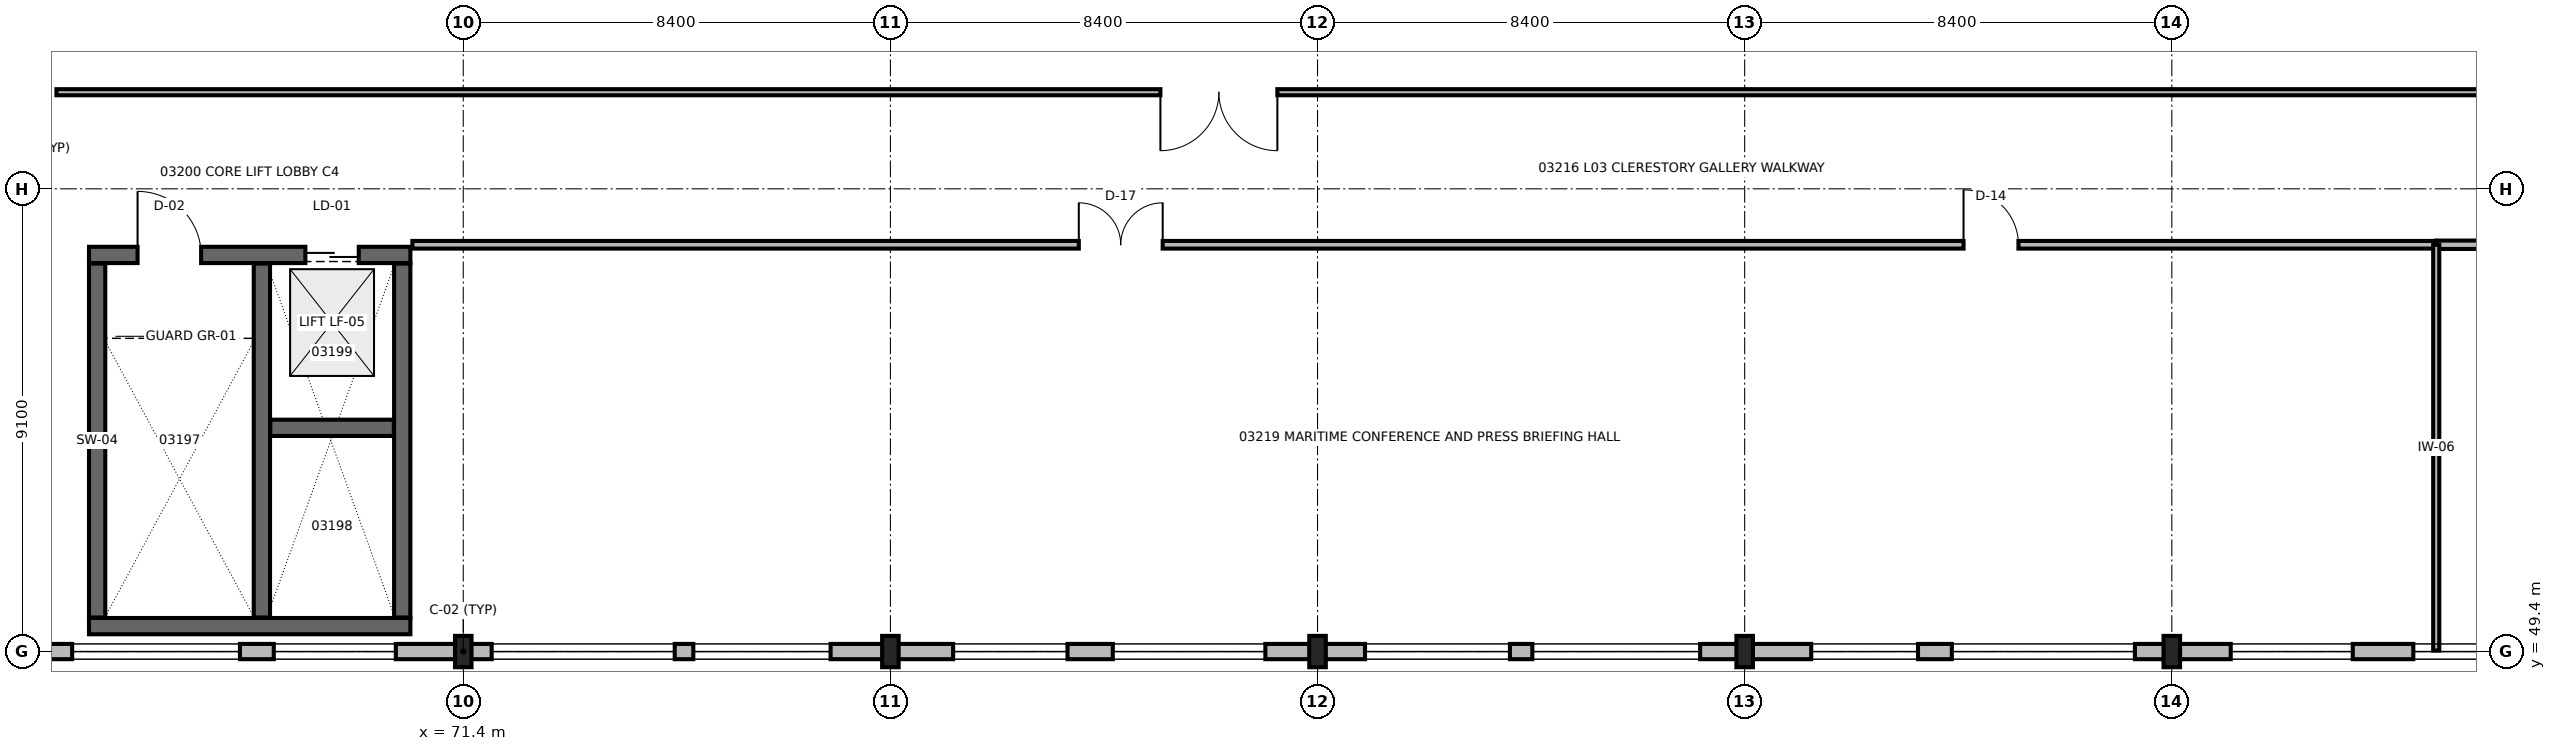
"""IFC4 building model, lengths in metres.
Left out: names, types, materials, properties, quantities, classifications, styles, units other than length and angle.
Written with IfcOpenShell. Run it as: python <this file> out.ifc"""

import sys

from ifc_helpers import new_model, si_unit, direction, frame, frame_2d, origin, origin_2d, place, context, subcontext, project, spatial, rectangle, i_section, extrude, element, fill, save


model = new_model("IFC4")
c1 = context("Model", 3, precision=1e-05, world=origin(), true_north=direction((0.0, 1.0)))
c2 = subcontext(c1, "Body", "Model", "MODEL_VIEW")
j1 = project(units=[si_unit("LENGTHUNIT", "METRE"), si_unit("PLANEANGLEUNIT", "RADIAN")], contexts=[c1])
p1 = place(None, origin())
s1 = spatial("IfcSite", under=j1, at=p1, CompositionType="ELEMENT")
p2 = place(p1, origin())
s2 = spatial("IfcBuilding", under=s1, at=p2, CompositionType="ELEMENT")
p3 = place(p2, frame((0.0, 0.0, 13.8)))
s3 = spatial("IfcBuildingStorey", under=s2, at=p3, CompositionType="ELEMENT", Elevation=13.8)
for number, where, z_axis, x_axis in (
    (1, (71.4, 49.4, 0.0), (0.0, 0.0, 1.0), (1.0, 0.0, 0.0)),
    (2, (79.8, 49.4, 0.0), (0.0, 0.0, 1.0), (1.0, 0.0, 0.0)),
    (3, (88.2, 49.4, 0.0), (0.0, 0.0, 1.0), (1.0, 0.0, 0.0)),
    (4, (96.6, 49.4, 0.0), (0.0, 0.0, 1.0), (1.0, 0.0, 0.0)),
    (5, (105.0, 49.4, 0.0), (0.0, 0.0, 1.0), (1.0, 0.0, 0.0)),
):
    element("IfcColumn", number, at=place(p3, frame(where, z_axis=z_axis, x_axis=x_axis)), inside=s3, PredefinedType="COLUMN", context=c2, shape_type="SweptSolid", body=[
        extrude(i_section(OverallWidth=0.325, OverallDepth=0.616, WebThickness=0.014, FlangeThickness=0.021, at=origin_2d()), origin(), (0.0, 0.0, 1.0), 10.273),
    ])
p4 = place(p3, frame((71.385, 49.4, 0.0), z_axis=(0.0, 0.0, 1.0), x_axis=(-1.0, 0.0, 0.0)))
e6 = element("IfcWall", 6, at=p4, inside=s3, PredefinedType="SOLIDWALL", context=c2, shape_type="SweptSolid", body=[
    extrude(rectangle(XDim=8.37, YDim=0.3, at=frame_2d((4.185, 0.0))), origin(), (0.0, 0.0, 1.0), 8.5),
])
p5 = place(p4, frame((1.311, 0.0, 5.4)))
e7 = element("IfcOpeningElement", 7, at=p5, cuts=e6, PredefinedType="OPENING", context=c2, shape_type="SweptSolid", body=[
    extrude(rectangle(XDim=2.4, YDim=1.15, at=frame_2d((1.2, 0.575))), frame((0.0, 0.16, 0.0), z_axis=(0.0, -1.0, 0.0), x_axis=(1.0, 0.0, 0.0)), (0.0, 0.0, 1.0), 0.32),
])
p6 = place(p4, frame((4.376, 0.0, 5.4)))
e8 = element("IfcOpeningElement", 8, at=p6, cuts=e6, PredefinedType="OPENING", context=c2, shape_type="SweptSolid", body=[
    extrude(rectangle(XDim=3.3, YDim=1.3, at=frame_2d((1.65, 0.65))), frame((0.0, 0.16, 0.0), z_axis=(0.0, -1.0, 0.0), x_axis=(1.0, 0.0, 0.0)), (0.0, 0.0, 1.0), 0.32),
])
p7 = place(p3, frame((79.785, 49.4, 0.0), z_axis=(0.0, 0.0, 1.0), x_axis=(-1.0, 0.0, 0.0)))
e9 = element("IfcWall", 9, at=p7, inside=s3, PredefinedType="SOLIDWALL", context=c2, shape_type="SweptSolid", body=[
    extrude(rectangle(XDim=8.37, YDim=0.3, at=frame_2d((4.185, 0.0))), origin(), (0.0, 0.0, 1.0), 8.5),
])
p8 = place(p7, frame((1.161, 0.0, 5.4)))
e10 = element("IfcOpeningElement", 10, at=p8, cuts=e9, PredefinedType="OPENING", context=c2, shape_type="SweptSolid", body=[
    extrude(rectangle(XDim=2.7, YDim=1.15, at=frame_2d((1.35, 0.575))), frame((0.0, 0.16, 0.0), z_axis=(0.0, -1.0, 0.0), x_axis=(1.0, 0.0, 0.0)), (0.0, 0.0, 1.0), 0.32),
])
p9 = place(p7, frame((4.226, 0.0, 5.4)))
e11 = element("IfcOpeningElement", 11, at=p9, cuts=e9, PredefinedType="OPENING", context=c2, shape_type="SweptSolid", body=[
    extrude(rectangle(XDim=3.6, YDim=1.3, at=frame_2d((1.8, 0.65))), frame((0.0, 0.16, 0.0), z_axis=(0.0, -1.0, 0.0), x_axis=(1.0, 0.0, 0.0)), (0.0, 0.0, 1.0), 0.32),
])
p10 = place(p3, frame((88.185, 49.4, 0.0), z_axis=(0.0, 0.0, 1.0), x_axis=(-1.0, 0.0, 0.0)))
e12 = element("IfcWall", 12, at=p10, inside=s3, PredefinedType="SOLIDWALL", context=c2, shape_type="SweptSolid", body=[
    extrude(rectangle(XDim=8.37, YDim=0.3, at=frame_2d((4.185, 0.0))), origin(), (0.0, 0.0, 1.0), 8.5),
])
p11 = place(p10, frame((1.011, 0.0, 5.4)))
e13 = element("IfcOpeningElement", 13, at=p11, cuts=e12, PredefinedType="OPENING", context=c2, shape_type="SweptSolid", body=[
    extrude(rectangle(XDim=3.0, YDim=1.2, at=frame_2d((1.5, 0.6))), frame((0.0, 0.16, 0.0), z_axis=(0.0, -1.0, 0.0), x_axis=(1.0, 0.0, 0.0)), (0.0, 0.0, 1.0), 0.32),
])
p12 = place(p10, frame((4.901, 0.0, 5.4)))
e14 = element("IfcOpeningElement", 14, at=p12, cuts=e12, PredefinedType="OPENING", context=c2, shape_type="SweptSolid", body=[
    extrude(rectangle(XDim=2.25, YDim=1.1, at=frame_2d((1.125, 0.55))), frame((0.0, 0.16, 0.0), z_axis=(0.0, -1.0, 0.0), x_axis=(1.0, 0.0, 0.0)), (0.0, 0.0, 1.0), 0.32),
])
p13 = place(p3, frame((96.585, 49.4, 0.0), z_axis=(0.0, 0.0, 1.0), x_axis=(-1.0, 0.0, 0.0)))
e15 = element("IfcWall", 15, at=p13, inside=s3, PredefinedType="SOLIDWALL", context=c2, shape_type="SweptSolid", body=[
    extrude(rectangle(XDim=8.37, YDim=0.3, at=frame_2d((4.185, 0.0))), origin(), (0.0, 0.0, 1.0), 8.5),
])
p14 = place(p13, frame((0.861, 0.0, 5.4)))
e16 = element("IfcOpeningElement", 16, at=p14, cuts=e15, PredefinedType="OPENING", context=c2, shape_type="SweptSolid", body=[
    extrude(rectangle(XDim=3.3, YDim=1.3, at=frame_2d((1.65, 0.65))), frame((0.0, 0.16, 0.0), z_axis=(0.0, -1.0, 0.0), x_axis=(1.0, 0.0, 0.0)), (0.0, 0.0, 1.0), 0.32),
])
p15 = place(p13, frame((4.601, 0.0, 5.4)))
e17 = element("IfcOpeningElement", 17, at=p15, cuts=e15, PredefinedType="OPENING", context=c2, shape_type="SweptSolid", body=[
    extrude(rectangle(XDim=2.85, YDim=1.25, at=frame_2d((1.425, 0.625))), frame((0.0, 0.16, 0.0), z_axis=(0.0, -1.0, 0.0), x_axis=(1.0, 0.0, 0.0)), (0.0, 0.0, 1.0), 0.32),
])
p16 = place(p3, frame((104.985, 49.4, 0.0), z_axis=(0.0, 0.0, 1.0), x_axis=(-1.0, 0.0, 0.0)))
e18 = element("IfcWall", 18, at=p16, inside=s3, PredefinedType="SOLIDWALL", context=c2, shape_type="SweptSolid", body=[
    extrude(rectangle(XDim=8.37, YDim=0.3, at=frame_2d((4.185, 0.0))), origin(), (0.0, 0.0, 1.0), 8.5),
])
p17 = place(p16, frame((0.711, 0.0, 5.4)))
e19 = element("IfcOpeningElement", 19, at=p17, cuts=e18, PredefinedType="OPENING", context=c2, shape_type="SweptSolid", body=[
    extrude(rectangle(XDim=3.6, YDim=1.3, at=frame_2d((1.8, 0.65))), frame((0.0, 0.16, 0.0), z_axis=(0.0, -1.0, 0.0), x_axis=(1.0, 0.0, 0.0)), (0.0, 0.0, 1.0), 0.32),
])
p18 = place(p16, frame((4.976, 0.0, 5.4)))
e20 = element("IfcOpeningElement", 20, at=p18, cuts=e18, PredefinedType="OPENING", context=c2, shape_type="SweptSolid", body=[
    extrude(rectangle(XDim=2.1, YDim=1.05, at=frame_2d((1.05, 0.525))), frame((0.0, 0.16, 0.0), z_axis=(0.0, -1.0, 0.0), x_axis=(1.0, 0.0, 0.0)), (0.0, 0.0, 1.0), 0.32),
])
p19 = place(p3, frame((113.385, 49.4, 0.0), z_axis=(0.0, 0.0, 1.0), x_axis=(-1.0, 0.0, 0.0)))
e21 = element("IfcWall", 21, at=p19, inside=s3, PredefinedType="SOLIDWALL", context=c2, shape_type="SweptSolid", body=[
    extrude(rectangle(XDim=8.37, YDim=0.3, at=frame_2d((4.185, 0.0))), origin(), (0.0, 0.0, 1.0), 8.5),
])
p20 = place(p19, frame((1.386, 0.0, 5.4)))
e22 = element("IfcOpeningElement", 22, at=p20, cuts=e21, PredefinedType="OPENING", context=c2, shape_type="SweptSolid", body=[
    extrude(rectangle(XDim=2.25, YDim=1.1, at=frame_2d((1.125, 0.55))), frame((0.0, 0.16, 0.0), z_axis=(0.0, -1.0, 0.0), x_axis=(1.0, 0.0, 0.0)), (0.0, 0.0, 1.0), 0.32),
])
p21 = place(p19, frame((4.826, 0.0, 5.4)))
e23 = element("IfcOpeningElement", 23, at=p21, cuts=e21, PredefinedType="OPENING", context=c2, shape_type="SweptSolid", body=[
    extrude(rectangle(XDim=2.4, YDim=1.15, at=frame_2d((1.2, 0.575))), frame((0.0, 0.16, 0.0), z_axis=(0.0, -1.0, 0.0), x_axis=(1.0, 0.0, 0.0)), (0.0, 0.0, 1.0), 0.32),
])
p22 = place(p3, frame((64.04, 49.9, 0.0), z_axis=(0.0, 0.0, 1.0), x_axis=(1.0, 0.0, 0.0)))
e24 = element("IfcWall", 24, at=p22, inside=s3, PredefinedType="SHEAR", context=c2, shape_type="SweptSolid", body=[
    extrude(rectangle(XDim=6.32, YDim=0.32, at=frame_2d((3.16, 0.0))), origin(), (0.0, 0.0, 1.0), 3.62),
])
p23 = place(p3, frame((64.04, 57.2, 0.0), z_axis=(0.0, 0.0, 1.0), x_axis=(1.0, 0.0, 0.0)))
e25 = element("IfcWall", 25, at=p23, inside=s3, PredefinedType="SHEAR", context=c2, shape_type="SweptSolid", body=[
    extrude(rectangle(XDim=6.32, YDim=0.32, at=frame_2d((3.16, 0.0))), origin(), (0.0, 0.0, 1.0), 3.62),
])
p24 = place(p23, frame((0.955, 0.0, 0.0)))
e26 = element("IfcOpeningElement", 26, at=p24, cuts=e25, PredefinedType="OPENING", context=c2, shape_type="SweptSolid", body=[
    extrude(rectangle(XDim=1.25, YDim=2.2, at=frame_2d((0.625, 1.1))), frame((0.0, 0.17, 0.0), z_axis=(0.0, -1.0, 0.0), x_axis=(1.0, 0.0, 0.0)), (0.0, 0.0, 1.0), 0.34),
])
p25 = place(p23, frame((4.255, 0.0, 0.0)))
e27 = element("IfcOpeningElement", 27, at=p25, cuts=e25, PredefinedType="OPENING", context=c2, shape_type="SweptSolid", body=[
    extrude(rectangle(XDim=1.05, YDim=2.15, at=frame_2d((0.525, 1.075))), frame((0.0, 0.17, 0.0), z_axis=(0.0, -1.0, 0.0), x_axis=(1.0, 0.0, 0.0)), (0.0, 0.0, 1.0), 0.34),
])
for number, where, z_axis, x_axis in (
    (28, (64.2, 50.07, 0.0), (0.0, 0.0, 1.0), (0.0, 1.0, 0.0)),
    (29, (70.2, 50.07, 0.0), (0.0, 0.0, 1.0), (0.0, 1.0, 0.0)),
    (30, (67.44, 50.07, 0.0), (0.0, 0.0, 1.0), (0.0, 1.0, 0.0)),
):
    element("IfcWall", number, at=place(p3, frame(where, z_axis=z_axis, x_axis=x_axis)), inside=s3, PredefinedType="SHEAR", context=c2, shape_type="SweptSolid", body=[
        extrude(rectangle(XDim=6.96, YDim=0.32, at=frame_2d((3.48, 0.0))), origin(), (0.0, 0.0, 1.0), 3.62),
    ])
p26 = place(p3, frame((67.605, 53.8, 0.0), z_axis=(0.0, 0.0, 1.0), x_axis=(1.0, 0.0, 0.0)))
e31 = element("IfcWall", 31, at=p26, inside=s3, PredefinedType="SHEAR", context=c2, shape_type="SweptSolid", body=[
    extrude(rectangle(XDim=2.43, YDim=0.32, at=frame_2d((1.215, 0.0))), origin(), (0.0, 0.0, 1.0), 3.62),
])
p27 = place(p3, frame((70.4, 57.4, 0.0), z_axis=(0.0, 0.0, 1.0), x_axis=(1.0, 0.0, 0.0)))
e32 = element("IfcWall", 32, at=p27, inside=s3, PredefinedType="PARTITIONING", context=c2, shape_type="SweptSolid", body=[
    extrude(rectangle(XDim=39.8, YDim=0.15, at=frame_2d((19.9, 0.0))), origin(), (0.0, 0.0, 1.0), 3.64),
])
p28 = place(p27, frame((13.105, 0.0, 0.0)))
e33 = element("IfcOpeningElement", 33, at=p28, cuts=e32, PredefinedType="OPENING", context=c2, shape_type="SweptSolid", body=[
    extrude(rectangle(XDim=1.65, YDim=2.3, at=frame_2d((0.825, 1.15))), frame((0.0, 0.085, 0.0), z_axis=(0.0, -1.0, 0.0), x_axis=(1.0, 0.0, 0.0)), (0.0, 0.0, 1.0), 0.17),
])
p29 = place(p27, frame((30.504, 0.0, 0.0)))
e34 = element("IfcOpeningElement", 34, at=p29, cuts=e32, PredefinedType="OPENING", context=c2, shape_type="SweptSolid", body=[
    extrude(rectangle(XDim=1.08, YDim=2.2, at=frame_2d((0.54, 1.1))), frame((0.0, 0.085, 0.0), z_axis=(0.0, -1.0, 0.0), x_axis=(1.0, 0.0, 0.0)), (0.0, 0.0, 1.0), 0.17),
])
p30 = place(p3, frame((110.2, 57.4, 0.0), z_axis=(0.0, 0.0, 1.0), x_axis=(1.0, 0.0, 0.0)))
e35 = element("IfcWall", 35, at=p30, inside=s3, PredefinedType="PARTITIONING", context=c2, shape_type="SweptSolid", body=[
    extrude(rectangle(XDim=28.36, YDim=0.165, at=frame_2d((14.18, 0.0))), origin(), (0.0, 0.0, 1.0), 3.64),
])
p31 = place(p30, frame((13.505, 0.0, 0.0)))
e36 = element("IfcOpeningElement", 36, at=p31, cuts=e35, PredefinedType="OPENING", context=c2, shape_type="SweptSolid", body=[
    extrude(rectangle(XDim=1.35, YDim=2.2, at=frame_2d((0.675, 1.1))), frame((0.0, 0.093, 0.0), z_axis=(0.0, -1.0, 0.0), x_axis=(1.0, 0.0, 0.0)), (0.0, 0.0, 1.0), 0.185),
])
p32 = place(p3, frame((110.2, 49.42, 0.0), z_axis=(0.0, 0.0, 1.0), x_axis=(0.0, 1.0, 0.0)))
e37 = element("IfcWall", 37, at=p32, inside=s3, PredefinedType="PARTITIONING", context=c2, shape_type="SweptSolid", body=[
    extrude(rectangle(XDim=7.98, YDim=0.12, at=frame_2d((3.99, 0.0))), origin(), (0.0, 0.0, 1.0), 3.64),
])
p33 = place(p3, frame((63.4, 60.4, 0.0), z_axis=(0.0, 0.0, 1.0), x_axis=(1.0, 0.0, 0.0)))
e38 = element("IfcWall", 38, at=p33, inside=s3, PredefinedType="PARTITIONING", context=c2, shape_type="SweptSolid", body=[
    extrude(rectangle(XDim=50.8, YDim=0.12, at=frame_2d((25.4, 0.0))), origin(), (0.0, 0.0, 1.0), 3.64),
])
p34 = place(p33, frame((21.71, 0.0, 0.0)))
e39 = element("IfcOpeningElement", 39, at=p34, cuts=e38, PredefinedType="OPENING", context=c2, shape_type="SweptSolid", body=[
    extrude(rectangle(XDim=2.3, YDim=2.45, at=frame_2d((1.15, 1.225))), frame((0.0, 0.07, 0.0), z_axis=(0.0, -1.0, 0.0), x_axis=(1.0, 0.0, 0.0)), (0.0, 0.0, 1.0), 0.14),
])
p35 = place(p5, origin())
e40 = element("IfcWindow", 40, at=p35, inside=s3, PartitioningType="SINGLE_PANEL", PredefinedType="SKYLIGHT", context=c2, shape_type="SweptSolid", body=[
    extrude(rectangle(XDim=2.4, YDim=1.15, at=frame_2d((1.2, 0.575))), frame((0.0, 0.03, 0.0), z_axis=(0.0, -1.0, 0.0), x_axis=(1.0, 0.0, 0.0)), (0.0, 0.0, 1.0), 0.06),
])
fill(e7, e40)
p36 = place(p6, origin())
e41 = element("IfcWindow", 41, at=p36, inside=s3, PartitioningType="SINGLE_PANEL", PredefinedType="SKYLIGHT", context=c2, shape_type="SweptSolid", body=[
    extrude(rectangle(XDim=3.3, YDim=1.3, at=frame_2d((1.65, 0.65))), frame((0.0, 0.03, 0.0), z_axis=(0.0, -1.0, 0.0), x_axis=(1.0, 0.0, 0.0)), (0.0, 0.0, 1.0), 0.06),
])
fill(e8, e41)
p37 = place(p8, origin())
e42 = element("IfcWindow", 42, at=p37, inside=s3, PartitioningType="SINGLE_PANEL", PredefinedType="SKYLIGHT", context=c2, shape_type="SweptSolid", body=[
    extrude(rectangle(XDim=2.7, YDim=1.15, at=frame_2d((1.35, 0.575))), frame((0.0, 0.03, 0.0), z_axis=(0.0, -1.0, 0.0), x_axis=(1.0, 0.0, 0.0)), (0.0, 0.0, 1.0), 0.06),
])
fill(e10, e42)
p38 = place(p9, origin())
e43 = element("IfcWindow", 43, at=p38, inside=s3, PartitioningType="SINGLE_PANEL", PredefinedType="SKYLIGHT", context=c2, shape_type="SweptSolid", body=[
    extrude(rectangle(XDim=3.6, YDim=1.3, at=frame_2d((1.8, 0.65))), frame((0.0, 0.03, 0.0), z_axis=(0.0, -1.0, 0.0), x_axis=(1.0, 0.0, 0.0)), (0.0, 0.0, 1.0), 0.06),
])
fill(e11, e43)
p39 = place(p11, origin())
e44 = element("IfcWindow", 44, at=p39, inside=s3, PartitioningType="SINGLE_PANEL", PredefinedType="SKYLIGHT", context=c2, shape_type="SweptSolid", body=[
    extrude(rectangle(XDim=3.0, YDim=1.2, at=frame_2d((1.5, 0.6))), frame((0.0, 0.03, 0.0), z_axis=(0.0, -1.0, 0.0), x_axis=(1.0, 0.0, 0.0)), (0.0, 0.0, 1.0), 0.06),
])
fill(e13, e44)
p40 = place(p12, origin())
e45 = element("IfcWindow", 45, at=p40, inside=s3, PartitioningType="SINGLE_PANEL", PredefinedType="SKYLIGHT", context=c2, shape_type="SweptSolid", body=[
    extrude(rectangle(XDim=2.25, YDim=1.1, at=frame_2d((1.125, 0.55))), frame((0.0, 0.03, 0.0), z_axis=(0.0, -1.0, 0.0), x_axis=(1.0, 0.0, 0.0)), (0.0, 0.0, 1.0), 0.06),
])
fill(e14, e45)
p41 = place(p14, origin())
e46 = element("IfcWindow", 46, at=p41, inside=s3, PartitioningType="SINGLE_PANEL", PredefinedType="SKYLIGHT", context=c2, shape_type="SweptSolid", body=[
    extrude(rectangle(XDim=3.3, YDim=1.3, at=frame_2d((1.65, 0.65))), frame((0.0, 0.03, 0.0), z_axis=(0.0, -1.0, 0.0), x_axis=(1.0, 0.0, 0.0)), (0.0, 0.0, 1.0), 0.06),
])
fill(e16, e46)
p42 = place(p15, origin())
e47 = element("IfcWindow", 47, at=p42, inside=s3, PartitioningType="SINGLE_PANEL", PredefinedType="SKYLIGHT", context=c2, shape_type="SweptSolid", body=[
    extrude(rectangle(XDim=2.85, YDim=1.25, at=frame_2d((1.425, 0.625))), frame((0.0, 0.03, 0.0), z_axis=(0.0, -1.0, 0.0), x_axis=(1.0, 0.0, 0.0)), (0.0, 0.0, 1.0), 0.06),
])
fill(e17, e47)
p43 = place(p17, origin())
e48 = element("IfcWindow", 48, at=p43, inside=s3, PartitioningType="SINGLE_PANEL", PredefinedType="SKYLIGHT", context=c2, shape_type="SweptSolid", body=[
    extrude(rectangle(XDim=3.6, YDim=1.3, at=frame_2d((1.8, 0.65))), frame((0.0, 0.03, 0.0), z_axis=(0.0, -1.0, 0.0), x_axis=(1.0, 0.0, 0.0)), (0.0, 0.0, 1.0), 0.06),
])
fill(e19, e48)
p44 = place(p18, origin())
e49 = element("IfcWindow", 49, at=p44, inside=s3, PartitioningType="SINGLE_PANEL", PredefinedType="SKYLIGHT", context=c2, shape_type="SweptSolid", body=[
    extrude(rectangle(XDim=2.1, YDim=1.05, at=frame_2d((1.05, 0.525))), frame((0.0, 0.03, 0.0), z_axis=(0.0, -1.0, 0.0), x_axis=(1.0, 0.0, 0.0)), (0.0, 0.0, 1.0), 0.06),
])
fill(e20, e49)
p45 = place(p20, origin())
e50 = element("IfcWindow", 50, at=p45, inside=s3, PartitioningType="SINGLE_PANEL", PredefinedType="SKYLIGHT", context=c2, shape_type="SweptSolid", body=[
    extrude(rectangle(XDim=2.25, YDim=1.1, at=frame_2d((1.125, 0.55))), frame((0.0, 0.03, 0.0), z_axis=(0.0, -1.0, 0.0), x_axis=(1.0, 0.0, 0.0)), (0.0, 0.0, 1.0), 0.06),
])
fill(e22, e50)
p46 = place(p21, origin())
e51 = element("IfcWindow", 51, at=p46, inside=s3, PartitioningType="SINGLE_PANEL", PredefinedType="SKYLIGHT", context=c2, shape_type="SweptSolid", body=[
    extrude(rectangle(XDim=2.4, YDim=1.15, at=frame_2d((1.2, 0.575))), frame((0.0, 0.03, 0.0), z_axis=(0.0, -1.0, 0.0), x_axis=(1.0, 0.0, 0.0)), (0.0, 0.0, 1.0), 0.06),
])
fill(e23, e51)
p47 = place(p24, origin())
e52 = element("IfcDoor", 52, at=p47, inside=s3, OperationType="SINGLE_SWING_LEFT", PredefinedType="DOOR", context=c2, shape_type="SweptSolid", body=[
    extrude(rectangle(XDim=1.25, YDim=2.2, at=frame_2d((0.625, 1.1))), frame((0.0, 0.025, 0.0), z_axis=(0.0, -1.0, 0.0), x_axis=(1.0, 0.0, 0.0)), (0.0, 0.0, 1.0), 0.05),
])
fill(e26, e52)
p48 = place(p25, origin())
e53 = element("IfcDoor", 53, at=p48, inside=s3, OperationType="DOUBLE_DOOR_SLIDING", PredefinedType="DOOR", context=c2, shape_type="SweptSolid", body=[
    extrude(rectangle(XDim=1.05, YDim=2.15, at=frame_2d((0.525, 1.075))), frame((0.0, 0.025, 0.0), z_axis=(0.0, -1.0, 0.0), x_axis=(1.0, 0.0, 0.0)), (0.0, 0.0, 1.0), 0.05),
])
fill(e27, e53)
p49 = place(p28, origin())
e54 = element("IfcDoor", 54, at=p49, inside=s3, OperationType="DOUBLE_DOOR_SINGLE_SWING", PredefinedType="DOOR", context=c2, shape_type="SweptSolid", body=[
    extrude(rectangle(XDim=1.65, YDim=2.3, at=frame_2d((0.825, 1.15))), frame((0.0, 0.025, 0.0), z_axis=(0.0, -1.0, 0.0), x_axis=(1.0, 0.0, 0.0)), (0.0, 0.0, 1.0), 0.05),
])
fill(e33, e54)
p50 = place(p29, origin())
e55 = element("IfcDoor", 55, at=p50, inside=s3, OperationType="SINGLE_SWING_LEFT", PredefinedType="DOOR", context=c2, shape_type="SweptSolid", body=[
    extrude(rectangle(XDim=1.08, YDim=2.2, at=frame_2d((0.54, 1.1))), frame((0.0, 0.025, 0.0), z_axis=(0.0, -1.0, 0.0), x_axis=(1.0, 0.0, 0.0)), (0.0, 0.0, 1.0), 0.05),
])
fill(e34, e55)
p51 = place(p34, frame((2.3, 0.0, 0.0), z_axis=(0.0, 0.0, 1.0), x_axis=(-1.0, 0.0, 0.0)))
e56 = element("IfcDoor", 56, at=p51, inside=s3, OperationType="DOUBLE_DOOR_SINGLE_SWING", PredefinedType="DOOR", context=c2, shape_type="SweptSolid", body=[
    extrude(rectangle(XDim=2.3, YDim=2.45, at=frame_2d((1.15, 1.225))), frame((0.0, 0.025, 0.0), z_axis=(0.0, -1.0, 0.0), x_axis=(1.0, 0.0, 0.0)), (0.0, 0.0, 1.0), 0.05),
])
fill(e39, e56)
save(model, sys.argv[1])
